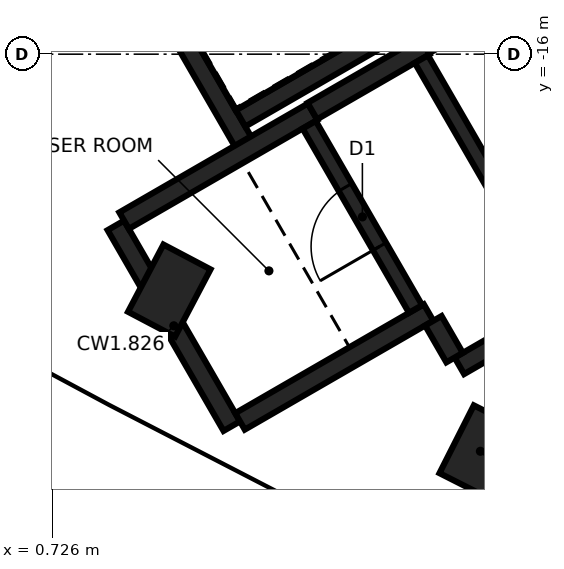
"""IFC4 building model, lengths in metres.
Left out: names, types, materials, properties, quantities, classifications, styles, units other than length and angle.
Written with IfcOpenShell. Run it as: python <this file> out.ifc"""

import sys

from ifc_helpers import new_model, si_unit, direction, frame, frame_2d, origin, origin_2d, place, context, subcontext, project, spatial, rectangle, extrude, element, fill, save


model = new_model("IFC4")
c1 = context("Model", 3, precision=1e-05, world=origin(), true_north=direction((0.0, 1.0)))
c2 = subcontext(c1, "Body", "Model", "MODEL_VIEW")
j1 = project(units=[si_unit("LENGTHUNIT", "METRE"), si_unit("PLANEANGLEUNIT", "RADIAN")], contexts=[c1])
p1 = place(None, origin())
s1 = spatial("IfcSite", under=j1, at=p1, CompositionType="ELEMENT")
p2 = place(p1, origin())
s2 = spatial("IfcBuilding", under=s1, at=p2, CompositionType="ELEMENT")
p3 = place(p2, frame((0.0, 0.0, 294.6)))
s3 = spatial("IfcBuildingStorey", under=s2, at=p3, CompositionType="ELEMENT", Elevation=294.6)
for number, where, z_axis, x_axis in (
    (1, (2.263, -19.11, -0.35), (0.0, 0.0, 1.0), (0.466, 0.885, 0.0)),
    (2, (6.356, -21.224, -0.35), (0.0, 0.0, 1.0), (0.452, 0.892, 0.0)),
):
    element("IfcColumn", number, at=place(p3, frame(where, z_axis=z_axis, x_axis=x_axis)), inside=s3, PredefinedType="COLUMN", context=c2, shape_type="SweptSolid", body=[
        extrude(rectangle(XDim=1.0, YDim=0.7, at=origin_2d()), origin(), (0.0, 0.0, 1.0), 3.6),
    ])
p4 = place(p3, frame((3.235, -17.153, 0.0), z_axis=(0.0, 0.0, 1.0), x_axis=(-0.500008851346, 0.866020293397, 0.0)))
e3 = element("IfcWall", 3, at=p4, inside=s3, PredefinedType="SHEAR", context=c2, shape_type="SweptSolid", body=[
    extrude(rectangle(XDim=5.51, YDim=0.25, at=frame_2d((2.755, 0.0))), origin(), (0.0, 0.0, 1.0), 3.25),
])
p5 = place(p3, frame((3.085, -20.894, 0.0), z_axis=(0.0, 0.0, 1.0), x_axis=(-0.499978833458, 0.866037623948, 0.0)))
e4 = element("IfcWall", 4, at=p5, inside=s3, PredefinedType="SHEAR", context=c2, shape_type="SweptSolid", body=[
    extrude(rectangle(XDim=3.05, YDim=0.25, at=frame_2d((1.525, 0.0))), origin(), (0.0, 0.0, 1.0), 3.25),
])
p6 = place(p3, frame((1.669, -18.19, 0.0), z_axis=(0.0, 0.0, 1.0), x_axis=(0.866042235819, 0.499970844928, 0.0)))
e5 = element("IfcWall", 5, at=p6, inside=s3, PredefinedType="SHEAR", context=c2, shape_type="SweptSolid", body=[
    extrude(rectangle(XDim=2.865, YDim=0.25, at=frame_2d((1.432, 0.0))), origin(), (0.0, 0.0, 1.0), 3.25),
])
p7 = place(p3, frame((5.675, -19.399, 0.0), z_axis=(0.0, 0.0, 1.0), x_axis=(-0.866026637627, -0.499997862916, 0.0)))
e6 = element("IfcWall", 6, at=p7, inside=s3, PredefinedType="SHEAR", context=c2, shape_type="SweptSolid", body=[
    extrude(rectangle(XDim=2.865, YDim=0.25, at=frame_2d((1.432, 0.0))), origin(), (0.0, 0.0, 1.0), 3.25),
])
p8 = place(p3, frame((5.431, -15.556, 0.0), z_axis=(0.0, 0.0, 1.0), x_axis=(-0.866022940537, -0.500004266446, 0.0)))
e7 = element("IfcWall", 7, at=p8, inside=s3, PredefinedType="SHEAR", context=c2, shape_type="SweptSolid", body=[
    extrude(rectangle(XDim=2.575, YDim=0.25, at=frame_2d((1.287, 0.0))), origin(), (0.0, 0.0, 1.0), 3.25),
])
p9 = place(p3, frame((4.145, -16.749, 0.0), z_axis=(0.0, 0.0, 1.0), x_axis=(0.866038183914, 0.499977863513, 0.0)))
e8 = element("IfcWall", 8, at=p9, inside=s3, PredefinedType="SHEAR", context=c2, shape_type="SweptSolid", body=[
    extrude(rectangle(XDim=1.71, YDim=0.25, at=frame_2d((0.855, 0.0))), origin(), (0.0, 0.0, 1.0), 3.25),
])
p10 = place(p3, frame((7.452, -19.308, 0.0), z_axis=(0.0, 0.0, 1.0), x_axis=(-0.866044474677, -0.49996696679, 0.0)))
e9 = element("IfcWall", 9, at=p10, inside=s3, PredefinedType="SHEAR", context=c2, shape_type="SweptSolid", body=[
    extrude(rectangle(XDim=1.584, YDim=0.25, at=frame_2d((0.792, 0.0))), origin(), (0.0, 0.0, 1.0), 3.25),
])
p11 = place(p3, frame((6.017, -19.992, 0.0), z_axis=(0.0, 0.0, 1.0), x_axis=(-0.500364886717, 0.865814633822, 0.0)))
e10 = element("IfcWall", 10, at=p11, inside=s3, PredefinedType="SHEAR", context=c2, shape_type="SweptSolid", body=[
    extrude(rectangle(XDim=0.559, YDim=0.25, at=frame_2d((0.28, 0.0))), origin(), (0.0, 0.0, 1.0), 3.25),
])
p12 = place(p3, frame((5.503, -19.352, 0.0), z_axis=(0.0, 0.0, 1.0), x_axis=(-0.499986818241, 0.866033014143, 0.0)))
e11 = element("IfcWall", 11, at=p12, inside=s3, PredefinedType="SHEAR", context=c2, shape_type="SweptSolid", body=[
    extrude(rectangle(XDim=2.798, YDim=0.2, at=frame_2d((1.399, 0.0))), origin(), (0.0, 0.0, 1.0), 3.25),
])
p13 = place(p12, frame((0.949, 0.0, 0.0)))
e12 = element("IfcOpeningElement", 12, at=p13, cuts=e11, PredefinedType="OPENING", context=c2, shape_type="SweptSolid", body=[
    extrude(rectangle(XDim=0.9, YDim=2.1, at=frame_2d((0.45, 1.05))), frame((0.0, 0.11, 0.0), z_axis=(0.0, -1.0, 0.0), x_axis=(1.0, 0.0, 0.0)), (0.0, 0.0, 1.0), 0.22),
])
p14 = place(p3, frame((6.96, -18.455, 0.0), z_axis=(0.0, 0.0, 1.0), x_axis=(-0.499926705758, 0.866067716099, 0.0)))
e13 = element("IfcWall", 13, at=p14, inside=s3, PredefinedType="SHEAR", context=c2, shape_type="SweptSolid", body=[
    extrude(rectangle(XDim=2.759, YDim=0.2, at=frame_2d((1.38, 0.0))), origin(), (0.0, 0.0, 1.0), 3.25),
])
p15 = place(p13, origin())
e14 = element("IfcDoor", 14, at=p15, inside=s3, OperationType="SINGLE_SWING_RIGHT", PredefinedType="DOOR", context=c2, shape_type="SweptSolid", body=[
    extrude(rectangle(XDim=0.9, YDim=2.1, at=frame_2d((0.45, 1.05))), frame((0.0, 0.025, 0.0), z_axis=(0.0, -1.0, 0.0), x_axis=(1.0, 0.0, 0.0)), (0.0, 0.0, 1.0), 0.05),
])
fill(e12, e14)
save(model, sys.argv[1])
